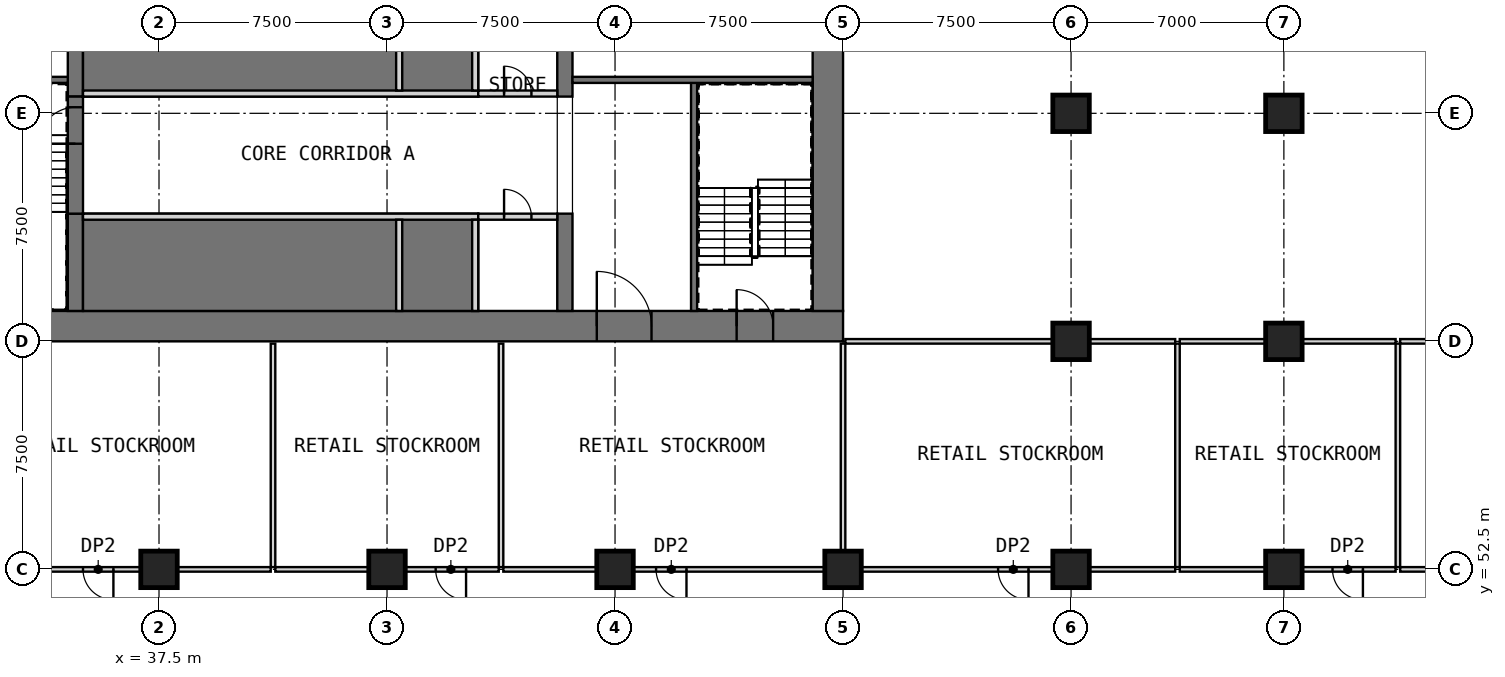
"""IFC4 building model, lengths in metres.
Left out: names, types, materials, properties, quantities, classifications, styles, units other than length and angle.
Written with IfcOpenShell. Run it as: python <this file> out.ifc"""

import sys

from ifc_helpers import new_model, si_unit, direction, frame, frame_2d, origin, origin_2d, place, context, subcontext, project, spatial, rectangle, extrude, element, fill, save


model = new_model("IFC4")
c1 = context("Model", 3, precision=1e-05, world=origin(), true_north=direction((0.0, 1.0)))
c2 = subcontext(c1, "Body", "Model", "MODEL_VIEW")
j1 = project(units=[si_unit("LENGTHUNIT", "METRE"), si_unit("PLANEANGLEUNIT", "RADIAN")], contexts=[c1])
p1 = place(None, origin())
s1 = spatial("IfcSite", under=j1, at=p1, CompositionType="ELEMENT")
p2 = place(p1, origin())
s2 = spatial("IfcBuilding", under=s1, at=p2, CompositionType="ELEMENT")
p3 = place(p2, frame((0.0, 0.0, -6.0)))
s3 = spatial("IfcBuildingStorey", under=s2, at=p3, CompositionType="ELEMENT", Elevation=-6.0)
for number, where, z_axis, x_axis in (
    (1, (37.5, 52.5, 0.0), (0.0, 0.0, 1.0), (1.0, 0.0, 0.0)),
    (2, (45.0, 52.5, 0.0), (0.0, 0.0, 1.0), (1.0, 0.0, 0.0)),
    (3, (52.5, 52.5, 0.0), (0.0, 0.0, 1.0), (1.0, 0.0, 0.0)),
    (4, (60.0, 52.5, 0.0), (0.0, 0.0, 1.0), (1.0, 0.0, 0.0)),
    (5, (67.5, 52.5, 0.0), (0.0, 0.0, 1.0), (1.0, 0.0, 0.0)),
    (6, (67.5, 60.0, 0.0), (0.0, 0.0, 1.0), (1.0, 0.0, 0.0)),
    (7, (67.5, 67.5, 0.0), (0.0, 0.0, 1.0), (1.0, 0.0, 0.0)),
    (8, (74.5, 52.5, 0.0), (0.0, 0.0, 1.0), (1.0, 0.0, 0.0)),
    (9, (74.5, 60.0, 0.0), (0.0, 0.0, 1.0), (1.0, 0.0, 0.0)),
    (10, (74.5, 67.5, 0.0), (0.0, 0.0, 1.0), (1.0, 0.0, 0.0)),
):
    element("IfcColumn", number, at=place(p3, frame(where, z_axis=z_axis, x_axis=x_axis)), inside=s3, PredefinedType="COLUMN", context=c2, shape_type="SweptSolid", body=[
        extrude(rectangle(XDim=1.2, YDim=1.2, at=origin_2d()), origin(), (0.0, 0.0, 1.0), 6.0),
    ])
p4 = place(p3, frame((30.0, 60.5, 0.0), z_axis=(0.0, 0.0, 1.0), x_axis=(1.0, 0.0, 0.0)))
e11 = element("IfcWall", 11, at=p4, inside=s3, PredefinedType="SHEAR", context=c2, shape_type="SweptSolid", body=[
    extrude(rectangle(XDim=30.0, YDim=1.0, at=frame_2d((15.0, 0.0))), origin(), (0.0, 0.0, 1.0), 6.0),
])
p5 = place(p4, frame((21.9, 0.0, 0.0)))
e12 = element("IfcOpeningElement", 12, at=p5, cuts=e11, PredefinedType="OPENING", context=c2, shape_type="SweptSolid", body=[
    extrude(rectangle(XDim=1.8, YDim=2.1, at=frame_2d((0.9, 1.05))), frame((0.0, 0.51, 0.0), z_axis=(0.0, -1.0, 0.0), x_axis=(1.0, 0.0, 0.0)), (0.0, 0.0, 1.0), 1.02),
])
p6 = place(p4, frame((26.5, 0.0, 0.0)))
e13 = element("IfcOpeningElement", 13, at=p6, cuts=e11, PredefinedType="OPENING", context=c2, shape_type="SweptSolid", body=[
    extrude(rectangle(XDim=1.2, YDim=2.1, at=frame_2d((0.6, 1.05))), frame((0.0, 0.51, 0.0), z_axis=(0.0, -1.0, 0.0), x_axis=(1.0, 0.0, 0.0)), (0.0, 0.0, 1.0), 1.02),
])
p7 = place(p3, frame((59.5, 61.0, 0.0), z_axis=(0.0, 0.0, 1.0), x_axis=(0.0, 1.0, 0.0)))
e14 = element("IfcWall", 14, at=p7, inside=s3, PredefinedType="SHEAR", context=c2, shape_type="SweptSolid", body=[
    extrude(rectangle(XDim=20.5, YDim=1.0, at=frame_2d((10.25, 0.0))), origin(), (0.0, 0.0, 1.0), 6.0),
])
p8 = place(p7, frame((14.5, 0.0, 0.0)))
e15 = element("IfcOpeningElement", 15, at=p8, cuts=e14, PredefinedType="OPENING", context=c2, shape_type="SweptSolid", body=[
    extrude(rectangle(XDim=1.8, YDim=2.1, at=frame_2d((0.9, 1.05))), frame((0.0, 0.51, 0.0), z_axis=(0.0, -1.0, 0.0), x_axis=(1.0, 0.0, 0.0)), (0.0, 0.0, 1.0), 1.02),
])
p9 = place(p3, frame((34.75, 61.0, 0.0), z_axis=(0.0, 0.0, 1.0), x_axis=(0.0, 1.0, 0.0)))
e16 = element("IfcWall", 16, at=p9, inside=s3, PredefinedType="SHEAR", context=c2, shape_type="SweptSolid", body=[
    extrude(rectangle(XDim=3.2, YDim=0.5, at=frame_2d((1.6, 0.0))), origin(), (0.0, 0.0, 1.0), 6.0),
])
p10 = place(p3, frame((34.75, 68.05, 0.0), z_axis=(0.0, 0.0, 1.0), x_axis=(0.0, 1.0, 0.0)))
e17 = element("IfcWall", 17, at=p10, inside=s3, PredefinedType="SHEAR", context=c2, shape_type="SweptSolid", body=[
    extrude(rectangle(XDim=6.4, YDim=0.5, at=frame_2d((3.2, 0.0))), origin(), (0.0, 0.0, 1.0), 6.0),
])
p11 = place(p3, frame((50.85, 61.0, 0.0), z_axis=(0.0, 0.0, 1.0), x_axis=(0.0, 1.0, 0.0)))
e18 = element("IfcWall", 18, at=p11, inside=s3, PredefinedType="SHEAR", context=c2, shape_type="SweptSolid", body=[
    extrude(rectangle(XDim=3.2, YDim=0.5, at=frame_2d((1.6, 0.0))), origin(), (0.0, 0.0, 1.0), 6.0),
])
p12 = place(p3, frame((50.85, 68.05, 0.0), z_axis=(0.0, 0.0, 1.0), x_axis=(0.0, 1.0, 0.0)))
e19 = element("IfcWall", 19, at=p12, inside=s3, PredefinedType="SHEAR", context=c2, shape_type="SweptSolid", body=[
    extrude(rectangle(XDim=6.4, YDim=0.5, at=frame_2d((3.2, 0.0))), origin(), (0.0, 0.0, 1.0), 6.0),
])
p13 = place(p3, frame((35.0, 62.6, 0.0), z_axis=(0.0, 0.0, 1.0), x_axis=(1.0, 0.0, 0.0)))
e20 = element("IfcWall", 20, at=p13, inside=s3, PredefinedType="SOLIDWALL", context=c2, shape_type="SweptSolid", body=[
    extrude(rectangle(XDim=13.0, YDim=3.2, at=frame_2d((6.5, 0.0))), origin(), (0.0, 0.0, 1.0), 4.4),
])
p14 = place(p3, frame((35.0, 64.1, 4.4), z_axis=(0.0, 0.0, 1.0), x_axis=(1.0, 0.0, 0.0)))
e21 = element("IfcWall", 21, at=p14, inside=s3, PredefinedType="SOLIDWALL", context=c2, shape_type="SweptSolid", body=[
    extrude(rectangle(XDim=13.0, YDim=0.2, at=frame_2d((6.5, 0.0))), origin(), (0.0, 0.0, 1.0), 1.6),
])
for number, where, z_axis, x_axis in (
    (22, (45.4, 61.0, 4.4), (0.0, 0.0, 1.0), (0.0, 1.0, 0.0)),
    (23, (47.9, 61.0, 4.4), (0.0, 0.0, 1.0), (0.0, 1.0, 0.0)),
):
    element("IfcWall", number, at=place(p3, frame(where, z_axis=z_axis, x_axis=x_axis)), inside=s3, PredefinedType="SOLIDWALL", context=c2, shape_type="SweptSolid", body=[
        extrude(rectangle(XDim=3.0, YDim=0.2, at=frame_2d((1.5, 0.0))), origin(), (0.0, 0.0, 1.0), 1.6),
    ])
p15 = place(p3, frame((48.0, 64.1, 0.0), z_axis=(0.0, 0.0, 1.0), x_axis=(1.0, 0.0, 0.0)))
e24 = element("IfcWall", 24, at=p15, inside=s3, PredefinedType="PARTITIONING", context=c2, shape_type="SweptSolid", body=[
    extrude(rectangle(XDim=2.6, YDim=0.2, at=frame_2d((1.3, 0.0))), origin(), (0.0, 0.0, 1.0), 5.7),
])
p16 = place(p15, frame((0.85, 0.0, 0.0)))
e25 = element("IfcOpeningElement", 25, at=p16, cuts=e24, PredefinedType="OPENING", context=c2, shape_type="SweptSolid", body=[
    extrude(rectangle(XDim=0.9, YDim=2.1, at=frame_2d((0.45, 1.05))), frame((0.0, 0.11, 0.0), z_axis=(0.0, -1.0, 0.0), x_axis=(1.0, 0.0, 0.0)), (0.0, 0.0, 1.0), 0.22),
])
p17 = place(p3, frame((35.0, 69.525, 0.0), z_axis=(0.0, 0.0, 1.0), x_axis=(1.0, 0.0, 0.0)))
e26 = element("IfcWall", 26, at=p17, inside=s3, PredefinedType="SOLIDWALL", context=c2, shape_type="SweptSolid", body=[
    extrude(rectangle(XDim=13.0, YDim=2.95, at=frame_2d((6.5, 0.0))), origin(), (0.0, 0.0, 1.0), 4.4),
])
p18 = place(p3, frame((35.0, 68.15, 4.4), z_axis=(0.0, 0.0, 1.0), x_axis=(1.0, 0.0, 0.0)))
e27 = element("IfcWall", 27, at=p18, inside=s3, PredefinedType="SOLIDWALL", context=c2, shape_type="SweptSolid", body=[
    extrude(rectangle(XDim=13.0, YDim=0.2, at=frame_2d((6.5, 0.0))), origin(), (0.0, 0.0, 1.0), 1.6),
])
for number, where, z_axis, x_axis in (
    (28, (45.4, 68.25, 4.4), (0.0, 0.0, 1.0), (0.0, 1.0, 0.0)),
    (29, (47.9, 68.25, 4.4), (0.0, 0.0, 1.0), (0.0, 1.0, 0.0)),
):
    element("IfcWall", number, at=place(p3, frame(where, z_axis=z_axis, x_axis=x_axis)), inside=s3, PredefinedType="SOLIDWALL", context=c2, shape_type="SweptSolid", body=[
        extrude(rectangle(XDim=2.75, YDim=0.2, at=frame_2d((1.375, 0.0))), origin(), (0.0, 0.0, 1.0), 1.6),
    ])
p19 = place(p3, frame((48.0, 68.15, 0.0), z_axis=(0.0, 0.0, 1.0), x_axis=(1.0, 0.0, 0.0)))
e30 = element("IfcWall", 30, at=p19, inside=s3, PredefinedType="PARTITIONING", context=c2, shape_type="SweptSolid", body=[
    extrude(rectangle(XDim=2.6, YDim=0.2, at=frame_2d((1.3, 0.0))), origin(), (0.0, 0.0, 1.0), 5.7),
])
p20 = place(p19, frame((0.85, 0.0, 0.0)))
e31 = element("IfcOpeningElement", 31, at=p20, cuts=e30, PredefinedType="OPENING", context=c2, shape_type="SweptSolid", body=[
    extrude(rectangle(XDim=0.9, YDim=2.1, at=frame_2d((0.45, 1.05))), frame((0.0, 0.11, 0.0), z_axis=(0.0, -1.0, 0.0), x_axis=(1.0, 0.0, 0.0)), (0.0, 0.0, 1.0), 0.22),
])
p21 = place(p3, frame((34.75, 64.2, 0.0), z_axis=(0.0, 0.0, 1.0), x_axis=(0.0, 1.0, 0.0)))
e32 = element("IfcWall", 32, at=p21, inside=s3, PredefinedType="SOLIDWALL", context=c2, shape_type="SweptSolid", body=[
    extrude(rectangle(XDim=3.85, YDim=0.5, at=frame_2d((1.925, 0.0))), origin(), (0.0, 0.0, 1.0), 4.8),
])
p22 = place(p21, frame((2.3, 0.0, 0.0)))
e33 = element("IfcOpeningElement", 33, at=p22, cuts=e32, PredefinedType="OPENING", context=c2, shape_type="SweptSolid", body=[
    extrude(rectangle(XDim=1.2, YDim=2.1, at=frame_2d((0.6, 1.05))), frame((0.0, 0.26, 0.0), z_axis=(0.0, -1.0, 0.0), x_axis=(1.0, 0.0, 0.0)), (0.0, 0.0, 1.0), 0.52),
])
p23 = place(p3, frame((31.0, 68.6, 0.0), z_axis=(0.0, 0.0, 1.0), x_axis=(1.0, 0.0, 0.0)))
e34 = element("IfcWall", 34, at=p23, inside=s3, PredefinedType="SOLIDWALL", context=c2, shape_type="SweptSolid", body=[
    extrude(rectangle(XDim=3.5, YDim=0.2, at=frame_2d((1.75, 0.0))), origin(), (0.0, 0.0, 1.0), 5.7),
])
p24 = place(p23, frame((1.3, 0.0, 0.0)))
e35 = element("IfcOpeningElement", 35, at=p24, cuts=e34, PredefinedType="OPENING", context=c2, shape_type="SweptSolid", body=[
    extrude(rectangle(XDim=0.9, YDim=2.1, at=frame_2d((0.45, 1.05))), frame((0.0, 0.11, 0.0), z_axis=(0.0, -1.0, 0.0), x_axis=(1.0, 0.0, 0.0)), (0.0, 0.0, 1.0), 0.22),
])
p25 = place(p3, frame((55.1, 61.0, 0.0), z_axis=(0.0, 0.0, 1.0), x_axis=(0.0, 1.0, 0.0)))
e36 = element("IfcWall", 36, at=p25, inside=s3, PredefinedType="SOLIDWALL", context=c2, shape_type="SweptSolid", body=[
    extrude(rectangle(XDim=7.6, YDim=0.2, at=frame_2d((3.8, 0.0))), origin(), (0.0, 0.0, 1.0), 5.7),
])
p26 = place(p3, frame((51.1, 68.6, 0.0), z_axis=(0.0, 0.0, 1.0), x_axis=(1.0, 0.0, 0.0)))
e37 = element("IfcWall", 37, at=p26, inside=s3, PredefinedType="SOLIDWALL", context=c2, shape_type="SweptSolid", body=[
    extrude(rectangle(XDim=7.9, YDim=0.2, at=frame_2d((3.95, 0.0))), origin(), (0.0, 0.0, 1.0), 5.7),
])
p27 = place(p3, frame((36.9, 52.5, 0.0), z_axis=(0.0, 0.0, 1.0), x_axis=(-1.0, 0.0, 0.0)))
e38 = element("IfcWall", 38, at=p27, inside=s3, PredefinedType="PARTITIONING", context=c2, shape_type="SweptSolid", body=[
    extrude(rectangle(XDim=5.9, YDim=0.15, at=frame_2d((2.95, 0.0))), origin(), (0.0, 0.0, 1.0), 5.7),
])
p28 = place(p27, frame((0.9, 0.0, 0.0)))
e39 = element("IfcOpeningElement", 39, at=p28, cuts=e38, PredefinedType="OPENING", context=c2, shape_type="SweptSolid", body=[
    extrude(rectangle(XDim=1.0, YDim=2.1, at=frame_2d((0.5, 1.05))), frame((0.0, 0.085, 0.0), z_axis=(0.0, -1.0, 0.0), x_axis=(1.0, 0.0, 0.0)), (0.0, 0.0, 1.0), 0.17),
])
for number, where, z_axis, x_axis in (
    (40, (38.1, 52.5, 0.0), (0.0, 0.0, 1.0), (1.0, 0.0, 0.0)),
    (41, (41.325, 52.5, 0.0), (0.0, 0.0, 1.0), (1.0, 0.0, 0.0)),
):
    element("IfcWall", number, at=place(p3, frame(where, z_axis=z_axis, x_axis=x_axis)), inside=s3, PredefinedType="PARTITIONING", context=c2, shape_type="SweptSolid", body=[
        extrude(rectangle(XDim=3.075, YDim=0.15, at=frame_2d((1.538, 0.0))), origin(), (0.0, 0.0, 1.0), 5.7),
    ])
p29 = place(p3, frame((48.675, 52.5, 0.0), z_axis=(0.0, 0.0, 1.0), x_axis=(-1.0, 0.0, 0.0)))
e42 = element("IfcWall", 42, at=p29, inside=s3, PredefinedType="PARTITIONING", context=c2, shape_type="SweptSolid", body=[
    extrude(rectangle(XDim=3.075, YDim=0.15, at=frame_2d((1.538, 0.0))), origin(), (0.0, 0.0, 1.0), 5.7),
])
p30 = place(p29, frame((1.075, 0.0, 0.0)))
e43 = element("IfcOpeningElement", 43, at=p30, cuts=e42, PredefinedType="OPENING", context=c2, shape_type="SweptSolid", body=[
    extrude(rectangle(XDim=1.0, YDim=2.1, at=frame_2d((0.5, 1.05))), frame((0.0, 0.085, 0.0), z_axis=(0.0, -1.0, 0.0), x_axis=(1.0, 0.0, 0.0)), (0.0, 0.0, 1.0), 0.17),
])
p31 = place(p3, frame((48.825, 52.5, 0.0), z_axis=(0.0, 0.0, 1.0), x_axis=(1.0, 0.0, 0.0)))
e44 = element("IfcWall", 44, at=p31, inside=s3, PredefinedType="PARTITIONING", context=c2, shape_type="SweptSolid", body=[
    extrude(rectangle(XDim=3.075, YDim=0.15, at=frame_2d((1.538, 0.0))), origin(), (0.0, 0.0, 1.0), 5.7),
])
p32 = place(p3, frame((59.4, 52.5, 0.0), z_axis=(0.0, 0.0, 1.0), x_axis=(-1.0, 0.0, 0.0)))
e45 = element("IfcWall", 45, at=p32, inside=s3, PredefinedType="PARTITIONING", context=c2, shape_type="SweptSolid", body=[
    extrude(rectangle(XDim=6.3, YDim=0.15, at=frame_2d((3.15, 0.0))), origin(), (0.0, 0.0, 1.0), 5.7),
])
p33 = place(p32, frame((4.55, 0.0, 0.0)))
e46 = element("IfcOpeningElement", 46, at=p33, cuts=e45, PredefinedType="OPENING", context=c2, shape_type="SweptSolid", body=[
    extrude(rectangle(XDim=1.0, YDim=2.1, at=frame_2d((0.5, 1.05))), frame((0.0, 0.085, 0.0), z_axis=(0.0, -1.0, 0.0), x_axis=(1.0, 0.0, 0.0)), (0.0, 0.0, 1.0), 0.17),
])
p34 = place(p3, frame((66.9, 52.5, 0.0), z_axis=(0.0, 0.0, 1.0), x_axis=(-1.0, 0.0, 0.0)))
e47 = element("IfcWall", 47, at=p34, inside=s3, PredefinedType="PARTITIONING", context=c2, shape_type="SweptSolid", body=[
    extrude(rectangle(XDim=6.3, YDim=0.15, at=frame_2d((3.15, 0.0))), origin(), (0.0, 0.0, 1.0), 5.7),
])
p35 = place(p34, frame((0.8, 0.0, 0.0)))
e48 = element("IfcOpeningElement", 48, at=p35, cuts=e47, PredefinedType="OPENING", context=c2, shape_type="SweptSolid", body=[
    extrude(rectangle(XDim=1.0, YDim=2.1, at=frame_2d((0.5, 1.05))), frame((0.0, 0.085, 0.0), z_axis=(0.0, -1.0, 0.0), x_axis=(1.0, 0.0, 0.0)), (0.0, 0.0, 1.0), 0.17),
])
for number, where, z_axis, x_axis in (
    (49, (68.1, 52.5, 0.0), (0.0, 0.0, 1.0), (1.0, 0.0, 0.0)),
    (50, (71.075, 52.5, 0.0), (0.0, 0.0, 1.0), (1.0, 0.0, 0.0)),
):
    element("IfcWall", number, at=place(p3, frame(where, z_axis=z_axis, x_axis=x_axis)), inside=s3, PredefinedType="PARTITIONING", context=c2, shape_type="SweptSolid", body=[
        extrude(rectangle(XDim=2.825, YDim=0.15, at=frame_2d((1.413, 0.0))), origin(), (0.0, 0.0, 1.0), 5.7),
    ])
p36 = place(p3, frame((78.175, 52.5, 0.0), z_axis=(0.0, 0.0, 1.0), x_axis=(-1.0, 0.0, 0.0)))
e51 = element("IfcWall", 51, at=p36, inside=s3, PredefinedType="PARTITIONING", context=c2, shape_type="SweptSolid", body=[
    extrude(rectangle(XDim=3.075, YDim=0.15, at=frame_2d((1.538, 0.0))), origin(), (0.0, 0.0, 1.0), 5.7),
])
p37 = place(p36, frame((1.075, 0.0, 0.0)))
e52 = element("IfcOpeningElement", 52, at=p37, cuts=e51, PredefinedType="OPENING", context=c2, shape_type="SweptSolid", body=[
    extrude(rectangle(XDim=1.0, YDim=2.1, at=frame_2d((0.5, 1.05))), frame((0.0, 0.085, 0.0), z_axis=(0.0, -1.0, 0.0), x_axis=(1.0, 0.0, 0.0)), (0.0, 0.0, 1.0), 0.17),
])
p38 = place(p3, frame((78.325, 52.5, 0.0), z_axis=(0.0, 0.0, 1.0), x_axis=(1.0, 0.0, 0.0)))
e53 = element("IfcWall", 53, at=p38, inside=s3, PredefinedType="PARTITIONING", context=c2, shape_type="SweptSolid", body=[
    extrude(rectangle(XDim=3.075, YDim=0.15, at=frame_2d((1.538, 0.0))), origin(), (0.0, 0.0, 1.0), 5.7),
])
p39 = place(p3, frame((60.075, 60.0, 0.0), z_axis=(0.0, 0.0, 1.0), x_axis=(1.0, 0.0, 0.0)))
e54 = element("IfcWall", 54, at=p39, inside=s3, PredefinedType="PARTITIONING", context=c2, shape_type="SweptSolid", body=[
    extrude(rectangle(XDim=6.825, YDim=0.15, at=frame_2d((3.413, 0.0))), origin(), (0.0, 0.0, 1.0), 5.7),
])
for number, where, z_axis, x_axis in (
    (55, (68.1, 60.0, 0.0), (0.0, 0.0, 1.0), (1.0, 0.0, 0.0)),
    (56, (71.075, 60.0, 0.0), (0.0, 0.0, 1.0), (1.0, 0.0, 0.0)),
):
    element("IfcWall", number, at=place(p3, frame(where, z_axis=z_axis, x_axis=x_axis)), inside=s3, PredefinedType="PARTITIONING", context=c2, shape_type="SweptSolid", body=[
        extrude(rectangle(XDim=2.825, YDim=0.15, at=frame_2d((1.413, 0.0))), origin(), (0.0, 0.0, 1.0), 5.7),
    ])
for number, where, z_axis, x_axis in (
    (57, (75.1, 60.0, 0.0), (0.0, 0.0, 1.0), (1.0, 0.0, 0.0)),
    (58, (78.325, 60.0, 0.0), (0.0, 0.0, 1.0), (1.0, 0.0, 0.0)),
):
    element("IfcWall", number, at=place(p3, frame(where, z_axis=z_axis, x_axis=x_axis)), inside=s3, PredefinedType="PARTITIONING", context=c2, shape_type="SweptSolid", body=[
        extrude(rectangle(XDim=3.075, YDim=0.15, at=frame_2d((1.538, 0.0))), origin(), (0.0, 0.0, 1.0), 5.7),
    ])
for number, where, z_axis, x_axis in (
    (59, (41.25, 52.575, 0.0), (0.0, 0.0, 1.0), (0.0, 1.0, 0.0)),
    (60, (48.75, 52.575, 0.0), (0.0, 0.0, 1.0), (0.0, 1.0, 0.0)),
):
    element("IfcWall", number, at=place(p3, frame(where, z_axis=z_axis, x_axis=x_axis)), inside=s3, PredefinedType="PARTITIONING", context=c2, shape_type="SweptSolid", body=[
        extrude(rectangle(XDim=7.35, YDim=0.15, at=frame_2d((3.675, 0.0))), origin(), (0.0, 0.0, 1.0), 5.7),
    ])
p40 = place(p3, frame((60.0, 53.1, 0.0), z_axis=(0.0, 0.0, 1.0), x_axis=(0.0, 1.0, 0.0)))
e61 = element("IfcWall", 61, at=p40, inside=s3, PredefinedType="PARTITIONING", context=c2, shape_type="SweptSolid", body=[
    extrude(rectangle(XDim=6.825, YDim=0.15, at=frame_2d((3.413, 0.0))), origin(), (0.0, 0.0, 1.0), 5.7),
])
for number, where, z_axis, x_axis in (
    (62, (71.0, 52.575, 0.0), (0.0, 0.0, 1.0), (0.0, 1.0, 0.0)),
    (63, (78.25, 52.575, 0.0), (0.0, 0.0, 1.0), (0.0, 1.0, 0.0)),
):
    element("IfcWall", number, at=place(p3, frame(where, z_axis=z_axis, x_axis=x_axis)), inside=s3, PredefinedType="PARTITIONING", context=c2, shape_type="SweptSolid", body=[
        extrude(rectangle(XDim=7.35, YDim=0.15, at=frame_2d((3.675, 0.0))), origin(), (0.0, 0.0, 1.0), 5.7),
    ])
p41 = place(p16, origin())
e64 = element("IfcDoor", 64, at=p41, inside=s3, OperationType="SINGLE_SWING_LEFT", PredefinedType="DOOR", context=c2, shape_type="SweptSolid", body=[
    extrude(rectangle(XDim=0.9, YDim=2.1, at=frame_2d((0.45, 1.05))), frame((0.0, 0.025, 0.0), z_axis=(0.0, -1.0, 0.0), x_axis=(1.0, 0.0, 0.0)), (0.0, 0.0, 1.0), 0.05),
])
fill(e25, e64)
p42 = place(p20, origin())
e65 = element("IfcDoor", 65, at=p42, inside=s3, OperationType="SINGLE_SWING_LEFT", PredefinedType="DOOR", context=c2, shape_type="SweptSolid", body=[
    extrude(rectangle(XDim=0.9, YDim=2.1, at=frame_2d((0.45, 1.05))), frame((0.0, 0.025, 0.0), z_axis=(0.0, -1.0, 0.0), x_axis=(1.0, 0.0, 0.0)), (0.0, 0.0, 1.0), 0.05),
])
fill(e31, e65)
p43 = place(p5, origin())
e66 = element("IfcDoor", 66, at=p43, inside=s3, OperationType="DOUBLE_DOOR_SINGLE_SWING", PredefinedType="DOOR", context=c2, shape_type="SweptSolid", body=[
    extrude(rectangle(XDim=1.8, YDim=2.1, at=frame_2d((0.9, 1.05))), frame((0.0, 0.025, 0.0), z_axis=(0.0, -1.0, 0.0), x_axis=(1.0, 0.0, 0.0)), (0.0, 0.0, 1.0), 0.05),
])
fill(e12, e66)
p44 = place(p22, origin())
e67 = element("IfcDoor", 67, at=p44, inside=s3, OperationType="SINGLE_SWING_LEFT", PredefinedType="DOOR", context=c2, shape_type="SweptSolid", body=[
    extrude(rectangle(XDim=1.2, YDim=2.1, at=frame_2d((0.6, 1.05))), frame((0.0, 0.025, 0.0), z_axis=(0.0, -1.0, 0.0), x_axis=(1.0, 0.0, 0.0)), (0.0, 0.0, 1.0), 0.05),
])
fill(e33, e67)
p45 = place(p6, origin())
e68 = element("IfcDoor", 68, at=p45, inside=s3, OperationType="SINGLE_SWING_LEFT", PredefinedType="DOOR", context=c2, shape_type="SweptSolid", body=[
    extrude(rectangle(XDim=1.2, YDim=2.1, at=frame_2d((0.6, 1.05))), frame((0.0, 0.025, 0.0), z_axis=(0.0, -1.0, 0.0), x_axis=(1.0, 0.0, 0.0)), (0.0, 0.0, 1.0), 0.05),
])
fill(e13, e68)
p46 = place(p28, origin())
e69 = element("IfcDoor", 69, at=p46, inside=s3, OperationType="SINGLE_SWING_LEFT", PredefinedType="DOOR", context=c2, shape_type="SweptSolid", body=[
    extrude(rectangle(XDim=1.0, YDim=2.1, at=frame_2d((0.5, 1.05))), frame((0.0, 0.025, 0.0), z_axis=(0.0, -1.0, 0.0), x_axis=(1.0, 0.0, 0.0)), (0.0, 0.0, 1.0), 0.05),
])
fill(e39, e69)
p47 = place(p30, origin())
e70 = element("IfcDoor", 70, at=p47, inside=s3, OperationType="SINGLE_SWING_LEFT", PredefinedType="DOOR", context=c2, shape_type="SweptSolid", body=[
    extrude(rectangle(XDim=1.0, YDim=2.1, at=frame_2d((0.5, 1.05))), frame((0.0, 0.025, 0.0), z_axis=(0.0, -1.0, 0.0), x_axis=(1.0, 0.0, 0.0)), (0.0, 0.0, 1.0), 0.05),
])
fill(e43, e70)
p48 = place(p33, origin())
e71 = element("IfcDoor", 71, at=p48, inside=s3, OperationType="SINGLE_SWING_LEFT", PredefinedType="DOOR", context=c2, shape_type="SweptSolid", body=[
    extrude(rectangle(XDim=1.0, YDim=2.1, at=frame_2d((0.5, 1.05))), frame((0.0, 0.025, 0.0), z_axis=(0.0, -1.0, 0.0), x_axis=(1.0, 0.0, 0.0)), (0.0, 0.0, 1.0), 0.05),
])
fill(e46, e71)
p49 = place(p35, origin())
e72 = element("IfcDoor", 72, at=p49, inside=s3, OperationType="SINGLE_SWING_LEFT", PredefinedType="DOOR", context=c2, shape_type="SweptSolid", body=[
    extrude(rectangle(XDim=1.0, YDim=2.1, at=frame_2d((0.5, 1.05))), frame((0.0, 0.025, 0.0), z_axis=(0.0, -1.0, 0.0), x_axis=(1.0, 0.0, 0.0)), (0.0, 0.0, 1.0), 0.05),
])
fill(e48, e72)
p50 = place(p37, origin())
e73 = element("IfcDoor", 73, at=p50, inside=s3, OperationType="SINGLE_SWING_LEFT", PredefinedType="DOOR", context=c2, shape_type="SweptSolid", body=[
    extrude(rectangle(XDim=1.0, YDim=2.1, at=frame_2d((0.5, 1.05))), frame((0.0, 0.025, 0.0), z_axis=(0.0, -1.0, 0.0), x_axis=(1.0, 0.0, 0.0)), (0.0, 0.0, 1.0), 0.05),
])
fill(e52, e73)
save(model, sys.argv[1])
